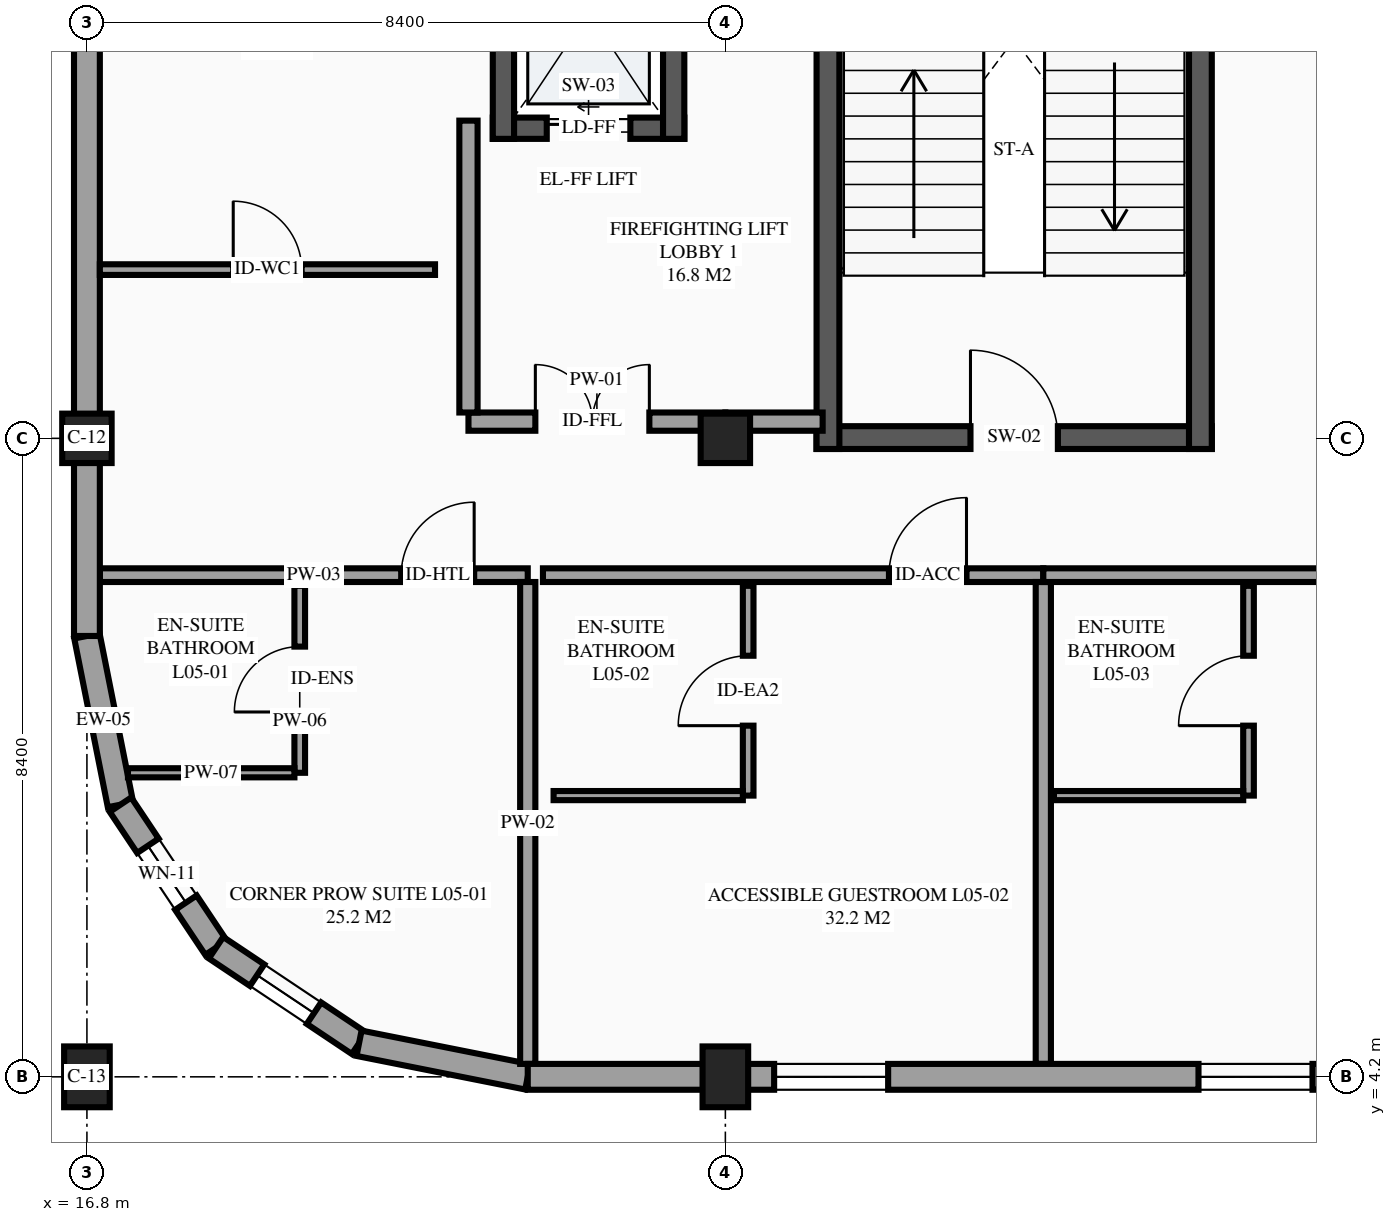
"""IFC4 building model, lengths in metres.
Left out: names, types, materials, properties, quantities, classifications, styles, units other than length and angle.
Written with IfcOpenShell. Run it as: python <this file> out.ifc"""

import sys

from ifc_helpers import new_model, si_unit, direction, frame, frame_2d, origin, origin_2d, place, context, subcontext, project, spatial, rectangle, extrude, element, fill, save


model = new_model("IFC4")
c1 = context("Model", 3, precision=1e-05, world=origin(), true_north=direction((0.0, 1.0)))
c2 = subcontext(c1, "Body", "Model", "MODEL_VIEW")
j1 = project(units=[si_unit("LENGTHUNIT", "METRE"), si_unit("PLANEANGLEUNIT", "RADIAN")], contexts=[c1])
p1 = place(None, origin())
s1 = spatial("IfcSite", under=j1, at=p1, CompositionType="ELEMENT")
p2 = place(p1, origin())
s2 = spatial("IfcBuilding", under=s1, at=p2, CompositionType="ELEMENT")
p3 = place(p2, frame((0.0, 0.0, 21.9)))
s3 = spatial("IfcBuildingStorey", under=s2, at=p3, CompositionType="ELEMENT", Elevation=21.9)
p4 = place(p3, frame((16.8, 4.2, 0.0), z_axis=(0.0, 0.0, 1.0), x_axis=(1.0, 0.0, 0.0)))
e1 = element("IfcColumn", 1, at=p4, inside=s3, PredefinedType="COLUMN", context=c2, shape_type="SweptSolid", body=[
    extrude(rectangle(XDim=0.6, YDim=0.8, at=origin_2d()), origin(), (0.0, 0.0, 1.0), 3.6),
])
p5 = place(p3, frame((16.8, 12.6, 0.0), z_axis=(0.0, 0.0, 1.0), x_axis=(1.0, 0.0, 0.0)))
e2 = element("IfcColumn", 2, at=p5, inside=s3, PredefinedType="COLUMN", context=c2, shape_type="SweptSolid", body=[
    extrude(rectangle(XDim=0.65, YDim=0.65, at=origin_2d()), origin(), (0.0, 0.0, 1.0), 3.6),
])
p6 = place(p3, frame((25.2, 4.2, 0.0), z_axis=(0.0, 0.0, 1.0), x_axis=(1.0, 0.0, 0.0)))
e3 = element("IfcColumn", 3, at=p6, inside=s3, PredefinedType="COLUMN", context=c2, shape_type="SweptSolid", body=[
    extrude(rectangle(XDim=0.6, YDim=0.8, at=origin_2d()), origin(), (0.0, 0.0, 1.0), 3.6),
])
p7 = place(p3, frame((25.2, 12.6, 0.0), z_axis=(0.0, 0.0, 1.0), x_axis=(1.0, 0.0, 0.0)))
e4 = element("IfcColumn", 4, at=p7, inside=s3, PredefinedType="COLUMN", context=c2, shape_type="SweptSolid", body=[
    extrude(rectangle(XDim=0.65, YDim=0.65, at=origin_2d()), origin(), (0.0, 0.0, 1.0), 3.6),
])
p8 = place(p3, frame((16.8, 10.0, 0.0), z_axis=(0.0, 0.0, 1.0), x_axis=(0.195057908159, -0.980791727363, 0.0)))
e5 = element("IfcWall", 5, at=p8, inside=s3, PredefinedType="STANDARD", context=c2, shape_type="SweptSolid", body=[
    extrude(rectangle(XDim=2.263, YDim=0.34, at=frame_2d((1.131, 0.0))), origin(), (0.0, 0.0, 1.0), 2.53),
])
p9 = place(p3, frame((17.241, 7.781, 0.0), z_axis=(0.0, 0.0, 1.0), x_axis=(0.555546297918, -0.831485604728, 0.0)))
e6 = element("IfcWall", 6, at=p9, inside=s3, PredefinedType="STANDARD", context=c2, shape_type="SweptSolid", body=[
    extrude(rectangle(XDim=2.263, YDim=0.34, at=frame_2d((1.132, 0.0))), origin(), (0.0, 0.0, 1.0), 3.6),
])
p10 = place(p9, frame((0.65, 0.0, 0.75)))
e7 = element("IfcOpeningElement", 7, at=p10, cuts=e6, PredefinedType="OPENING", context=c2, shape_type="SweptSolid", body=[
    extrude(rectangle(XDim=0.9, YDim=1.55, at=frame_2d((0.45, 0.775))), frame((0.0, 0.18, 0.0), z_axis=(0.0, -1.0, 0.0), x_axis=(1.0, 0.0, 0.0)), (0.0, 0.0, 1.0), 0.36),
])
p11 = place(p3, frame((18.499, 5.899, 0.0), z_axis=(0.0, 0.0, 1.0), x_axis=(0.831502143458, -0.555521543618, 0.0)))
e8 = element("IfcWall", 8, at=p11, inside=s3, PredefinedType="STANDARD", context=c2, shape_type="SweptSolid", body=[
    extrude(rectangle(XDim=2.263, YDim=0.34, at=frame_2d((1.131, 0.0))), origin(), (0.0, 0.0, 1.0), 3.6),
])
p12 = place(p11, frame((0.65, 0.0, 0.75)))
e9 = element("IfcOpeningElement", 9, at=p12, cuts=e8, PredefinedType="OPENING", context=c2, shape_type="SweptSolid", body=[
    extrude(rectangle(XDim=0.9, YDim=1.55, at=frame_2d((0.45, 0.775))), frame((0.0, 0.18, 0.0), z_axis=(0.0, -1.0, 0.0), x_axis=(1.0, 0.0, 0.0)), (0.0, 0.0, 1.0), 0.36),
])
p13 = place(p3, frame((20.38, 4.642, 0.0), z_axis=(0.0, 0.0, 1.0), x_axis=(0.98077519094, -0.195141038321, 0.0)))
e10 = element("IfcWall", 10, at=p13, inside=s3, PredefinedType="STANDARD", context=c2, shape_type="SweptSolid", body=[
    extrude(rectangle(XDim=2.263, YDim=0.34, at=frame_2d((1.132, 0.0))), origin(), (0.0, 0.0, 1.0), 2.63),
])
p14 = place(p3, frame((16.8, 21.0, 0.0), z_axis=(0.0, 0.0, 1.0), x_axis=(0.0, -1.0, 0.0)))
e11 = element("IfcWall", 11, at=p14, inside=s3, PredefinedType="STANDARD", context=c2, shape_type="SweptSolid", body=[
    extrude(rectangle(XDim=8.4, YDim=0.34, at=frame_2d((4.2, 0.0))), origin(), (0.0, 0.0, 1.0), 2.63),
])
p15 = place(p3, frame((22.14, 16.68, 0.0), z_axis=(0.0, 0.0, 1.0), x_axis=(1.0, 0.0, 0.0)))
e12 = element("IfcWall", 12, at=p15, inside=s3, PredefinedType="SHEAR", context=c2, shape_type="SweptSolid", body=[
    extrude(rectangle(XDim=2.52, YDim=0.28, at=frame_2d((1.26, 0.0))), origin(), (0.0, 0.0, 1.0), 3.6),
])
p16 = place(p15, frame((0.71, 0.0, 0.0)))
e13 = element("IfcOpeningElement", 13, at=p16, cuts=e12, PredefinedType="OPENING", context=c2, shape_type="SweptSolid", body=[
    extrude(rectangle(XDim=1.1, YDim=2.2, at=frame_2d((0.55, 1.1))), frame((0.0, 0.15, 0.0), z_axis=(0.0, -1.0, 0.0), x_axis=(1.0, 0.0, 0.0)), (0.0, 0.0, 1.0), 0.3),
])
for number, where, z_axis, x_axis in (
    (14, (24.52, 16.54, 0.0), (0.0, 0.0, 1.0), (0.0, 1.0, 0.0)),
    (15, (22.28, 19.86, 0.0), (0.0, 0.0, 1.0), (0.0, -1.0, 0.0)),
):
    element("IfcWall", number, at=place(p3, frame(where, z_axis=z_axis, x_axis=x_axis)), inside=s3, PredefinedType="SHEAR", context=c2, shape_type="SweptSolid", body=[
        extrude(rectangle(XDim=3.32, YDim=0.28, at=frame_2d((1.66, 0.0))), origin(), (0.0, 0.0, 1.0), 3.6),
    ])
p17 = place(p3, frame((26.4, 12.61, 0.0), z_axis=(0.0, 0.0, 1.0), x_axis=(1.0, 0.0, 0.0)))
e16 = element("IfcWall", 16, at=p17, inside=s3, PredefinedType="SHEAR", context=c2, shape_type="SweptSolid", body=[
    extrude(rectangle(XDim=5.2, YDim=0.3, at=frame_2d((2.6, 0.0))), origin(), (0.0, 0.0, 1.0), 3.6),
])
p18 = place(p17, frame((2.025, 0.0, 0.0)))
e17 = element("IfcOpeningElement", 17, at=p18, cuts=e16, PredefinedType="OPENING", context=c2, shape_type="SweptSolid", body=[
    extrude(rectangle(XDim=1.15, YDim=2.15, at=frame_2d((0.575, 1.075))), frame((0.0, 0.16, 0.0), z_axis=(0.0, -1.0, 0.0), x_axis=(1.0, 0.0, 0.0)), (0.0, 0.0, 1.0), 0.32),
])
for number, where, z_axis, x_axis in (
    (18, (31.45, 12.46, 0.0), (0.0, 0.0, 1.0), (0.0, 1.0, 0.0)),
    (19, (26.55, 21.3, 0.0), (0.0, 0.0, 1.0), (0.0, -1.0, 0.0)),
):
    element("IfcWall", number, at=place(p3, frame(where, z_axis=z_axis, x_axis=x_axis)), inside=s3, PredefinedType="SHEAR", context=c2, shape_type="SweptSolid", body=[
        extrude(rectangle(XDim=8.84, YDim=0.3, at=frame_2d((4.42, 0.0))), origin(), (0.0, 0.0, 1.0), 3.6),
    ])
p19 = place(p3, frame((16.97, 10.8, 0.0), z_axis=(0.0, 0.0, 1.0), x_axis=(1.0, 0.0, 0.0)))
e20 = element("IfcWall", 20, at=p19, inside=s3, PredefinedType="PARTITIONING", context=c2, shape_type="SweptSolid", body=[
    extrude(rectangle(XDim=5.63, YDim=0.18, at=frame_2d((2.815, 0.0))), origin(), (0.0, 0.0, 1.0), 3.375),
])
p20 = place(p19, frame((3.965, 0.0, 0.0)))
e21 = element("IfcOpeningElement", 21, at=p20, cuts=e20, PredefinedType="OPENING", context=c2, shape_type="SweptSolid", body=[
    extrude(rectangle(XDim=0.96, YDim=2.15, at=frame_2d((0.48, 1.075))), frame((0.0, 0.1, 0.0), z_axis=(0.0, -1.0, 0.0), x_axis=(1.0, 0.0, 0.0)), (0.0, 0.0, 1.0), 0.2),
])
p21 = place(p3, frame((22.6, 4.37, 0.0), z_axis=(0.0, 0.0, 1.0), x_axis=(0.0, 1.0, 0.0)))
e22 = element("IfcWall", 22, at=p21, inside=s3, PredefinedType="PARTITIONING", context=c2, shape_type="SweptSolid", body=[
    extrude(rectangle(XDim=6.34, YDim=0.2, at=frame_2d((3.17, 0.0))), origin(), (0.0, 0.0, 1.0), 3.375),
])
p22 = place(p3, frame((19.6, 8.2, 0.0), z_axis=(0.0, 0.0, 1.0), x_axis=(0.0, 1.0, 0.0)))
e23 = element("IfcWall", 23, at=p22, inside=s3, PredefinedType="PARTITIONING", context=c2, shape_type="SweptSolid", body=[
    extrude(rectangle(XDim=2.46, YDim=0.14, at=frame_2d((1.23, 0.0))), origin(), (0.0, 0.0, 1.0), 3.375),
])
p23 = place(p22, frame((0.8, 0.0, 0.0)))
e24 = element("IfcOpeningElement", 24, at=p23, cuts=e23, PredefinedType="OPENING", context=c2, shape_type="SweptSolid", body=[
    extrude(rectangle(XDim=0.86, YDim=2.1, at=frame_2d((0.43, 1.05))), frame((0.0, 0.08, 0.0), z_axis=(0.0, -1.0, 0.0), x_axis=(1.0, 0.0, 0.0)), (0.0, 0.0, 1.0), 0.16),
])
p24 = place(p3, frame((17.34, 8.2, 0.0), z_axis=(0.0, 0.0, 1.0), x_axis=(1.0, 0.0, 0.0)))
e25 = element("IfcWall", 25, at=p24, inside=s3, PredefinedType="PARTITIONING", context=c2, shape_type="SweptSolid", body=[
    extrude(rectangle(XDim=2.19, YDim=0.12, at=frame_2d((1.095, 0.0))), origin(), (0.0, 0.0, 1.0), 3.375),
])
p25 = place(p3, frame((22.8, 10.8, 0.0), z_axis=(0.0, 0.0, 1.0), x_axis=(1.0, 0.0, 0.0)))
e26 = element("IfcWall", 26, at=p25, inside=s3, PredefinedType="PARTITIONING", context=c2, shape_type="SweptSolid", body=[
    extrude(rectangle(XDim=6.583, YDim=0.18, at=frame_2d((3.292, 0.0))), origin(), (0.0, 0.0, 1.0), 3.375),
])
p26 = place(p25, frame((4.552, 0.0, 0.0)))
e27 = element("IfcOpeningElement", 27, at=p26, cuts=e26, PredefinedType="OPENING", context=c2, shape_type="SweptSolid", body=[
    extrude(rectangle(XDim=1.02, YDim=2.15, at=frame_2d((0.51, 1.075))), frame((0.0, 0.1, 0.0), z_axis=(0.0, -1.0, 0.0), x_axis=(1.0, 0.0, 0.0)), (0.0, 0.0, 1.0), 0.2),
])
p27 = place(p3, frame((29.383, 4.37, 0.0), z_axis=(0.0, 0.0, 1.0), x_axis=(0.0, 1.0, 0.0)))
e28 = element("IfcWall", 28, at=p27, inside=s3, PredefinedType="PARTITIONING", context=c2, shape_type="SweptSolid", body=[
    extrude(rectangle(XDim=6.34, YDim=0.2, at=frame_2d((3.17, 0.0))), origin(), (0.0, 0.0, 1.0), 3.375),
])
p28 = place(p3, frame((25.5, 7.9, 0.0), z_axis=(0.0, 0.0, 1.0), x_axis=(0.0, 1.0, 0.0)))
e29 = element("IfcWall", 29, at=p28, inside=s3, PredefinedType="PARTITIONING", context=c2, shape_type="SweptSolid", body=[
    extrude(rectangle(XDim=2.76, YDim=0.14, at=frame_2d((1.38, 0.0))), origin(), (0.0, 0.0, 1.0), 3.375),
])
p29 = place(p28, frame((0.92, 0.0, 0.0)))
e30 = element("IfcOpeningElement", 30, at=p29, cuts=e29, PredefinedType="OPENING", context=c2, shape_type="SweptSolid", body=[
    extrude(rectangle(XDim=0.92, YDim=2.1, at=frame_2d((0.46, 1.05))), frame((0.0, 0.08, 0.0), z_axis=(0.0, -1.0, 0.0), x_axis=(1.0, 0.0, 0.0)), (0.0, 0.0, 1.0), 0.16),
])
p30 = place(p3, frame((22.94, 7.9, 0.0), z_axis=(0.0, 0.0, 1.0), x_axis=(1.0, 0.0, 0.0)))
e31 = element("IfcWall", 31, at=p30, inside=s3, PredefinedType="PARTITIONING", context=c2, shape_type="SweptSolid", body=[
    extrude(rectangle(XDim=2.49, YDim=0.12, at=frame_2d((1.245, 0.0))), origin(), (0.0, 0.0, 1.0), 3.375),
])
p31 = place(p3, frame((29.383, 10.8, 0.0), z_axis=(0.0, 0.0, 1.0), x_axis=(1.0, 0.0, 0.0)))
e32 = element("IfcWall", 32, at=p31, inside=s3, PredefinedType="PARTITIONING", context=c2, shape_type="SweptSolid", body=[
    extrude(rectangle(XDim=6.583, YDim=0.18, at=frame_2d((3.292, 0.0))), origin(), (0.0, 0.0, 1.0), 3.375),
])
p32 = place(p31, frame((4.903, 0.0, 0.0)))
e33 = element("IfcOpeningElement", 33, at=p32, cuts=e32, PredefinedType="OPENING", context=c2, shape_type="SweptSolid", body=[
    extrude(rectangle(XDim=1.02, YDim=2.15, at=frame_2d((0.51, 1.075))), frame((0.0, 0.1, 0.0), z_axis=(0.0, -1.0, 0.0), x_axis=(1.0, 0.0, 0.0)), (0.0, 0.0, 1.0), 0.2),
])
p33 = place(p3, frame((32.083, 7.9, 0.0), z_axis=(0.0, 0.0, 1.0), x_axis=(0.0, 1.0, 0.0)))
e34 = element("IfcWall", 34, at=p33, inside=s3, PredefinedType="PARTITIONING", context=c2, shape_type="SweptSolid", body=[
    extrude(rectangle(XDim=2.76, YDim=0.14, at=frame_2d((1.38, 0.0))), origin(), (0.0, 0.0, 1.0), 3.375),
])
p34 = place(p33, frame((0.92, 0.0, 0.0)))
e35 = element("IfcOpeningElement", 35, at=p34, cuts=e34, PredefinedType="OPENING", context=c2, shape_type="SweptSolid", body=[
    extrude(rectangle(XDim=0.92, YDim=2.1, at=frame_2d((0.46, 1.05))), frame((0.0, 0.08, 0.0), z_axis=(0.0, -1.0, 0.0), x_axis=(1.0, 0.0, 0.0)), (0.0, 0.0, 1.0), 0.16),
])
p35 = place(p3, frame((29.523, 7.9, 0.0), z_axis=(0.0, 0.0, 1.0), x_axis=(1.0, 0.0, 0.0)))
e36 = element("IfcWall", 36, at=p35, inside=s3, PredefinedType="PARTITIONING", context=c2, shape_type="SweptSolid", body=[
    extrude(rectangle(XDim=2.49, YDim=0.12, at=frame_2d((1.245, 0.0))), origin(), (0.0, 0.0, 1.0), 3.375),
])
p36 = place(p3, frame((21.82, 12.82, 0.0), z_axis=(0.0, 0.0, 1.0), x_axis=(1.0, 0.0, 0.0)))
e37 = element("IfcWall", 37, at=p36, inside=s3, PredefinedType="PARTITIONING", context=c2, shape_type="SweptSolid", body=[
    extrude(rectangle(XDim=3.38, YDim=0.24, at=frame_2d((1.69, 0.0))), origin(), (0.0, 0.0, 1.0), 2.53),
])
p37 = place(p36, frame((0.88, 0.0, 0.0)))
e38 = element("IfcOpeningElement", 38, at=p37, cuts=e37, PredefinedType="OPENING", context=c2, shape_type="SweptSolid", body=[
    extrude(rectangle(XDim=1.5, YDim=2.15, at=frame_2d((0.75, 1.075))), frame((0.0, 0.13, 0.0), z_axis=(0.0, -1.0, 0.0), x_axis=(1.0, 0.0, 0.0)), (0.0, 0.0, 1.0), 0.26),
])
p38 = place(p3, frame((21.82, 12.94, 0.0), z_axis=(0.0, 0.0, 1.0), x_axis=(0.0, 1.0, 0.0)))
e39 = element("IfcWall", 39, at=p38, inside=s3, PredefinedType="PARTITIONING", context=c2, shape_type="SweptSolid", body=[
    extrude(rectangle(XDim=3.84, YDim=0.24, at=frame_2d((1.92, 0.0))), origin(), (0.0, 0.0, 1.0), 3.375),
])
p39 = place(p3, frame((16.97, 14.82, 0.0), z_axis=(0.0, 0.0, 1.0), x_axis=(1.0, 0.0, 0.0)))
e40 = element("IfcWall", 40, at=p39, inside=s3, PredefinedType="PARTITIONING", context=c2, shape_type="SweptSolid", body=[
    extrude(rectangle(XDim=4.41, YDim=0.14, at=frame_2d((2.205, 0.0))), origin(), (0.0, 0.0, 1.0), 3.375),
])
p40 = place(p39, frame((1.755, 0.0, 0.0)))
e41 = element("IfcOpeningElement", 41, at=p40, cuts=e40, PredefinedType="OPENING", context=c2, shape_type="SweptSolid", body=[
    extrude(rectangle(XDim=0.9, YDim=2.12, at=frame_2d((0.45, 1.06))), frame((0.0, 0.08, 0.0), z_axis=(0.0, -1.0, 0.0), x_axis=(1.0, 0.0, 0.0)), (0.0, 0.0, 1.0), 0.16),
])
p41 = place(p3, frame((22.6, 4.2, 0.0), z_axis=(0.0, 0.0, 1.0), x_axis=(1.0, 0.0, 0.0)))
e42 = element("IfcWall", 42, at=p41, inside=s3, PredefinedType="STANDARD", context=c2, shape_type="SweptSolid", body=[
    extrude(rectangle(XDim=11.0, YDim=0.34, at=frame_2d((5.5, 0.0))), origin(), (0.0, 0.0, 1.0), 2.63),
])
p42 = place(p41, frame((3.242, 0.0, 0.85)))
e43 = element("IfcOpeningElement", 43, at=p42, cuts=e42, PredefinedType="OPENING", context=c2, shape_type="SweptSolid", body=[
    extrude(rectangle(XDim=1.5, YDim=1.5, at=frame_2d((0.75, 0.75))), frame((0.0, 0.18, 0.0), z_axis=(0.0, -1.0, 0.0), x_axis=(1.0, 0.0, 0.0)), (0.0, 0.0, 1.0), 0.36),
])
p43 = place(p41, frame((8.825, 0.0, 0.85)))
e44 = element("IfcOpeningElement", 44, at=p43, cuts=e42, PredefinedType="OPENING", context=c2, shape_type="SweptSolid", body=[
    extrude(rectangle(XDim=1.5, YDim=1.5, at=frame_2d((0.75, 0.75))), frame((0.0, 0.18, 0.0), z_axis=(0.0, -1.0, 0.0), x_axis=(1.0, 0.0, 0.0)), (0.0, 0.0, 1.0), 0.36),
])
p44 = place(p3, frame((16.8, 12.6, 0.0), z_axis=(0.0, 0.0, 1.0), x_axis=(0.0, -1.0, 0.0)))
e45 = element("IfcWall", 45, at=p44, inside=s3, PredefinedType="STANDARD", context=c2, shape_type="SweptSolid", body=[
    extrude(rectangle(XDim=2.6, YDim=0.34, at=frame_2d((1.3, 0.0))), origin(), (0.0, 0.0, 1.0), 2.53),
])
p45 = place(p3, frame((25.2, 12.82, 0.0), z_axis=(0.0, 0.0, 1.0), x_axis=(1.0, 0.0, 0.0)))
e46 = element("IfcWall", 46, at=p45, inside=s3, PredefinedType="PARTITIONING", context=c2, shape_type="SweptSolid", body=[
    extrude(rectangle(XDim=1.28, YDim=0.24, at=frame_2d((0.64, 0.0))), origin(), (0.0, 0.0, 1.0), 2.63),
])
p46 = place(p10, origin())
e47 = element("IfcWindow", 47, at=p46, inside=s3, PartitioningType="SINGLE_PANEL", PredefinedType="WINDOW", context=c2, shape_type="SweptSolid", body=[
    extrude(rectangle(XDim=0.9, YDim=1.55, at=frame_2d((0.45, 0.775))), frame((0.0, 0.03, 0.0), z_axis=(0.0, -1.0, 0.0), x_axis=(1.0, 0.0, 0.0)), (0.0, 0.0, 1.0), 0.06),
])
fill(e7, e47)
p47 = place(p12, origin())
e48 = element("IfcWindow", 48, at=p47, inside=s3, PartitioningType="SINGLE_PANEL", PredefinedType="WINDOW", context=c2, shape_type="SweptSolid", body=[
    extrude(rectangle(XDim=0.9, YDim=1.55, at=frame_2d((0.45, 0.775))), frame((0.0, 0.03, 0.0), z_axis=(0.0, -1.0, 0.0), x_axis=(1.0, 0.0, 0.0)), (0.0, 0.0, 1.0), 0.06),
])
fill(e9, e48)
p48 = place(p42, origin())
e49 = element("IfcWindow", 49, at=p48, inside=s3, PartitioningType="SINGLE_PANEL", PredefinedType="WINDOW", context=c2, shape_type="SweptSolid", body=[
    extrude(rectangle(XDim=1.5, YDim=1.5, at=frame_2d((0.75, 0.75))), frame((0.0, 0.03, 0.0), z_axis=(0.0, -1.0, 0.0), x_axis=(1.0, 0.0, 0.0)), (0.0, 0.0, 1.0), 0.06),
])
fill(e43, e49)
p49 = place(p43, origin())
e50 = element("IfcWindow", 50, at=p49, inside=s3, PartitioningType="SINGLE_PANEL", PredefinedType="WINDOW", context=c2, shape_type="SweptSolid", body=[
    extrude(rectangle(XDim=1.5, YDim=1.5, at=frame_2d((0.75, 0.75))), frame((0.0, 0.03, 0.0), z_axis=(0.0, -1.0, 0.0), x_axis=(1.0, 0.0, 0.0)), (0.0, 0.0, 1.0), 0.06),
])
fill(e44, e50)
p50 = place(p16, origin())
e51 = element("IfcDoor", 51, at=p50, inside=s3, OperationType="SLIDING_TO_LEFT", PredefinedType="DOOR", context=c2, shape_type="SweptSolid", body=[
    extrude(rectangle(XDim=1.1, YDim=2.2, at=frame_2d((0.55, 1.1))), frame((0.0, 0.025, 0.0), z_axis=(0.0, -1.0, 0.0), x_axis=(1.0, 0.0, 0.0)), (0.0, 0.0, 1.0), 0.05),
])
fill(e13, e51)
p51 = place(p18, origin())
e52 = element("IfcDoor", 52, at=p51, inside=s3, OperationType="SINGLE_SWING_LEFT", PredefinedType="DOOR", context=c2, shape_type="SweptSolid", body=[
    extrude(rectangle(XDim=1.15, YDim=2.15, at=frame_2d((0.575, 1.075))), frame((0.0, 0.025, 0.0), z_axis=(0.0, -1.0, 0.0), x_axis=(1.0, 0.0, 0.0)), (0.0, 0.0, 1.0), 0.05),
])
fill(e17, e52)
p52 = place(p20, origin())
e53 = element("IfcDoor", 53, at=p52, inside=s3, OperationType="SINGLE_SWING_RIGHT", PredefinedType="DOOR", context=c2, shape_type="SweptSolid", body=[
    extrude(rectangle(XDim=0.96, YDim=2.15, at=frame_2d((0.48, 1.075))), frame((0.0, 0.025, 0.0), z_axis=(0.0, -1.0, 0.0), x_axis=(1.0, 0.0, 0.0)), (0.0, 0.0, 1.0), 0.05),
])
fill(e21, e53)
p53 = place(p23, origin())
e54 = element("IfcDoor", 54, at=p53, inside=s3, OperationType="SINGLE_SWING_LEFT", PredefinedType="DOOR", context=c2, shape_type="SweptSolid", body=[
    extrude(rectangle(XDim=0.86, YDim=2.1, at=frame_2d((0.43, 1.05))), frame((0.0, 0.025, 0.0), z_axis=(0.0, -1.0, 0.0), x_axis=(1.0, 0.0, 0.0)), (0.0, 0.0, 1.0), 0.05),
])
fill(e24, e54)
p54 = place(p26, origin())
e55 = element("IfcDoor", 55, at=p54, inside=s3, OperationType="SINGLE_SWING_RIGHT", PredefinedType="DOOR", context=c2, shape_type="SweptSolid", body=[
    extrude(rectangle(XDim=1.02, YDim=2.15, at=frame_2d((0.51, 1.075))), frame((0.0, 0.025, 0.0), z_axis=(0.0, -1.0, 0.0), x_axis=(1.0, 0.0, 0.0)), (0.0, 0.0, 1.0), 0.05),
])
fill(e27, e55)
p55 = place(p29, origin())
e56 = element("IfcDoor", 56, at=p55, inside=s3, OperationType="SINGLE_SWING_LEFT", PredefinedType="DOOR", context=c2, shape_type="SweptSolid", body=[
    extrude(rectangle(XDim=0.92, YDim=2.1, at=frame_2d((0.46, 1.05))), frame((0.0, 0.025, 0.0), z_axis=(0.0, -1.0, 0.0), x_axis=(1.0, 0.0, 0.0)), (0.0, 0.0, 1.0), 0.05),
])
fill(e30, e56)
p56 = place(p34, origin())
e57 = element("IfcDoor", 57, at=p56, inside=s3, OperationType="SINGLE_SWING_LEFT", PredefinedType="DOOR", context=c2, shape_type="SweptSolid", body=[
    extrude(rectangle(XDim=0.92, YDim=2.1, at=frame_2d((0.46, 1.05))), frame((0.0, 0.025, 0.0), z_axis=(0.0, -1.0, 0.0), x_axis=(1.0, 0.0, 0.0)), (0.0, 0.0, 1.0), 0.05),
])
fill(e35, e57)
p57 = place(p37, origin())
e58 = element("IfcDoor", 58, at=p57, inside=s3, OperationType="DOUBLE_DOOR_SINGLE_SWING", PredefinedType="DOOR", context=c2, shape_type="SweptSolid", body=[
    extrude(rectangle(XDim=1.5, YDim=2.15, at=frame_2d((0.75, 1.075))), frame((0.0, 0.025, 0.0), z_axis=(0.0, -1.0, 0.0), x_axis=(1.0, 0.0, 0.0)), (0.0, 0.0, 1.0), 0.05),
])
fill(e38, e58)
p58 = place(p40, origin())
e59 = element("IfcDoor", 59, at=p58, inside=s3, OperationType="SINGLE_SWING_LEFT", PredefinedType="DOOR", context=c2, shape_type="SweptSolid", body=[
    extrude(rectangle(XDim=0.9, YDim=2.12, at=frame_2d((0.45, 1.06))), frame((0.0, 0.025, 0.0), z_axis=(0.0, -1.0, 0.0), x_axis=(1.0, 0.0, 0.0)), (0.0, 0.0, 1.0), 0.05),
])
fill(e41, e59)
save(model, sys.argv[1])
